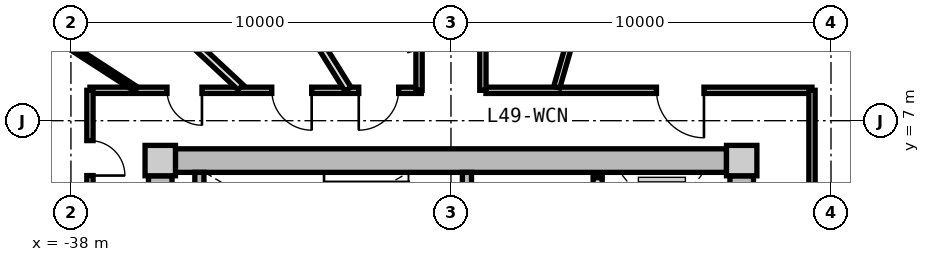
"""IFC4 building model, lengths in metres.
Left out: names, types, materials, properties, quantities, classifications, styles, units other than length and angle.
Written with IfcOpenShell. Run it as: python <this file> out.ifc"""

import sys

from ifc_helpers import new_model, si_unit, direction, frame, frame_2d, origin, origin_2d, place, context, subcontext, project, spatial, rectangle, extrude, source, transform, mapped, element, fill, save


model = new_model("IFC4")
c1 = context("Model", 3, precision=1e-05, world=origin(), true_north=direction((0.0, 1.0)))
c2 = subcontext(c1, "Body", "Model", "MODEL_VIEW")
j1 = project(units=[si_unit("LENGTHUNIT", "METRE"), si_unit("PLANEANGLEUNIT", "RADIAN")], contexts=[c1])
p1 = place(None, origin())
s1 = spatial("IfcSite", under=j1, at=p1, CompositionType="ELEMENT")
p2 = place(p1, origin())
s2 = spatial("IfcBuilding", under=s1, at=p2, CompositionType="ELEMENT")
p3 = place(p2, frame((0.0, 0.0, 158.7)))
s3 = spatial("IfcBuildingStorey", under=s2, at=p3, CompositionType="ELEMENT", Elevation=158.7)
m1 = source(origin(), c2, "Body", "SweptSolid", [
    extrude(rectangle(XDim=0.8, YDim=0.8, at=origin_2d()), origin(), (0.0, 0.0, 1.0), 3.05),
])
for number, where, z_axis, x_axis in (
    (1, (-20.35, 5.95, 0.0), (0.0, 0.0, 1.0), (1.0, 0.0, 0.0)),
    (2, (-35.65, 5.95, 0.0), (0.0, 0.0, 1.0), (1.0, 0.0, 0.0)),
):
    element("IfcColumn", number, at=place(p3, frame(where, z_axis=z_axis, x_axis=x_axis)), inside=s3, PredefinedType="COLUMN", context=c2, shape_type="MappedRepresentation", body=[
        mapped(m1, transform((0.0, 0.0, 0.0), x_axis=(1.0, 0.0, 0.0), y_axis=(0.0, 1.0, 0.0), z_axis=(0.0, 0.0, 1.0), scale=1.0)),
    ])
m2 = source(origin(), c2, "Body", "SweptSolid", [
    extrude(rectangle(XDim=14.5, YDim=0.62, at=frame_2d((7.25, 0.0))), origin(), (0.0, 0.0, 1.0), 2.81),
])
p4 = place(p3, frame((-35.25, 5.95, 0.0), z_axis=(0.0, 0.0, 1.0), x_axis=(1.0, 0.0, 0.0)))
e3 = element("IfcWall", 3, at=p4, inside=s3, PredefinedType="SHEAR", context=c2, shape_type="MappedRepresentation", body=[
    mapped(m2, transform((0.0, 0.0, 0.0), x_axis=(1.0, 0.0, 0.0), y_axis=(0.0, 1.0, 0.0), z_axis=(0.0, 0.0, 1.0), scale=1.0)),
])
m3 = source(origin(), c2, "Body", "SweptSolid", [
    extrude(rectangle(XDim=11.1, YDim=0.62, at=frame_2d((5.55, 0.0))), origin(), (0.0, 0.0, 1.0), 2.81),
])
p5 = place(p3, frame((-35.65, -5.55, 0.0), z_axis=(0.0, 0.0, 1.0), x_axis=(0.0, 1.0, 0.0)))
e4 = element("IfcWall", 4, at=p5, inside=s3, PredefinedType="SHEAR", context=c2, shape_type="MappedRepresentation", body=[
    mapped(m3, transform((0.0, 0.0, 0.0), x_axis=(1.0, 0.0, 0.0), y_axis=(0.0, 1.0, 0.0), z_axis=(0.0, 0.0, 1.0), scale=1.0)),
])
p6 = place(p5, frame((3.8, 0.0, 0.0)))
e5 = element("IfcOpeningElement", 5, at=p6, cuts=e4, PredefinedType="OPENING", context=c2, shape_type="SweptSolid", body=[
    extrude(rectangle(XDim=1.2, YDim=2.15, at=frame_2d((0.6, 1.075))), frame((0.0, 0.32, 0.0), z_axis=(0.0, -1.0, 0.0), x_axis=(1.0, 0.0, 0.0)), (0.0, 0.0, 1.0), 0.64),
])
p7 = place(p3, frame((-20.35, 5.55, 0.0), z_axis=(0.0, 0.0, 1.0), x_axis=(0.0, -1.0, 0.0)))
e6 = element("IfcWall", 6, at=p7, inside=s3, PredefinedType="SHEAR", context=c2, shape_type="MappedRepresentation", body=[
    mapped(m3, transform((0.0, 0.0, 0.0), x_axis=(1.0, 0.0, 0.0), y_axis=(0.0, 1.0, 0.0), z_axis=(0.0, 0.0, 1.0), scale=1.0)),
])
p8 = place(p7, frame((5.65, 0.0, 0.0)))
e7 = element("IfcOpeningElement", 7, at=p8, cuts=e6, PredefinedType="OPENING", context=c2, shape_type="SweptSolid", body=[
    extrude(rectangle(XDim=1.2, YDim=2.15, at=frame_2d((0.6, 1.075))), frame((0.0, 0.32, 0.0), z_axis=(0.0, -1.0, 0.0), x_axis=(1.0, 0.0, 0.0)), (0.0, 0.0, 1.0), 0.64),
])
m4 = source(origin(), c2, "Body", "SweptSolid", [
    extrude(rectangle(XDim=3.19, YDim=0.24, at=frame_2d((1.595, 0.0))), origin(), (0.0, 0.0, 1.0), 2.81),
])
p9 = place(p3, frame((-34.62, 2.45, 0.0), z_axis=(0.0, 0.0, 1.0), x_axis=(0.0, 1.0, 0.0)))
e8 = element("IfcWall", 8, at=p9, inside=s3, PredefinedType="PARTITIONING", context=c2, shape_type="MappedRepresentation", body=[
    mapped(m4, transform((0.0, 0.0, 0.0), x_axis=(1.0, 0.0, 0.0), y_axis=(0.0, 1.0, 0.0), z_axis=(0.0, 0.0, 1.0), scale=1.0)),
])
p10 = place(p3, frame((-27.58, 2.45, 0.0), z_axis=(0.0, 0.0, 1.0), x_axis=(0.0, 1.0, 0.0)))
e9 = element("IfcWall", 9, at=p10, inside=s3, PredefinedType="PARTITIONING", context=c2, shape_type="MappedRepresentation", body=[
    mapped(m4, transform((0.0, 0.0, 0.0), x_axis=(1.0, 0.0, 0.0), y_axis=(0.0, 1.0, 0.0), z_axis=(0.0, 0.0, 1.0), scale=1.0)),
])
p11 = place(p10, frame((0.55, 0.0, 0.0)))
e10 = element("IfcOpeningElement", 10, at=p11, cuts=e9, PredefinedType="OPENING", context=c2, shape_type="SweptSolid", body=[
    extrude(rectangle(XDim=1.1, YDim=2.15, at=frame_2d((0.55, 1.075))), frame((0.0, 0.13, 0.0), z_axis=(0.0, -1.0, 0.0), x_axis=(1.0, 0.0, 0.0)), (0.0, 0.0, 1.0), 0.26),
])
m5 = source(origin(), c2, "Body", "SweptSolid", [
    extrude(rectangle(XDim=5.0, YDim=0.24, at=frame_2d((2.5, 0.0))), origin(), (0.0, 0.0, 1.0), 2.795),
])
p12 = place(p3, frame((-24.14, 0.5, 0.0), z_axis=(0.0, 0.0, 1.0), x_axis=(0.0, 1.0, 0.0)))
e11 = element("IfcWall", 11, at=p12, inside=s3, PredefinedType="PARTITIONING", context=c2, shape_type="MappedRepresentation", body=[
    mapped(m5, transform((0.0, 0.0, 0.0), x_axis=(1.0, 0.0, 0.0), y_axis=(0.0, 1.0, 0.0), z_axis=(0.0, 0.0, 1.0), scale=1.0)),
])
p13 = place(p12, frame((3.05, 0.0, 0.0)))
e12 = element("IfcOpeningElement", 12, at=p13, cuts=e11, PredefinedType="OPENING", context=c2, shape_type="SweptSolid", body=[
    extrude(rectangle(XDim=1.3, YDim=2.2, at=frame_2d((0.65, 1.1))), frame((0.0, 0.13, 0.0), z_axis=(0.0, -1.0, 0.0), x_axis=(1.0, 0.0, 0.0)), (0.0, 0.0, 1.0), 0.26),
])
p14 = place(p12, frame((0.55, 0.0, 0.0)))
e13 = element("IfcOpeningElement", 13, at=p14, cuts=e11, PredefinedType="OPENING", context=c2, shape_type="SweptSolid", body=[
    extrude(rectangle(XDim=1.3, YDim=2.2, at=frame_2d((0.65, 1.1))), frame((0.0, 0.13, 0.0), z_axis=(0.0, -1.0, 0.0), x_axis=(1.0, 0.0, 0.0)), (0.0, 0.0, 1.0), 0.26),
])
m6 = source(origin(), c2, "Body", "SweptSolid", [
    extrude(rectangle(XDim=8.719, YDim=0.165, at=frame_2d((4.36, 0.0))), origin(), (0.0, 0.0, 1.0), 2.795),
])
p15 = place(p3, frame((-37.5, 7.8, 0.0), z_axis=(0.0, 0.0, 1.0), x_axis=(1.0, 0.0, 0.0)))
e14 = element("IfcWall", 14, at=p15, inside=s3, PredefinedType="PARTITIONING", context=c2, shape_type="MappedRepresentation", body=[
    mapped(m6, transform((0.0, 0.0, 0.0), x_axis=(1.0, 0.0, 0.0), y_axis=(0.0, 1.0, 0.0), z_axis=(0.0, 0.0, 1.0), scale=1.0)),
])
p16 = place(p15, frame((7.073, 0.0, 0.0)))
e15 = element("IfcOpeningElement", 15, at=p16, cuts=e14, PredefinedType="OPENING", context=c2, shape_type="SweptSolid", body=[
    extrude(rectangle(XDim=1.05, YDim=2.15, at=frame_2d((0.525, 1.075))), frame((0.0, 0.093, 0.0), z_axis=(0.0, -1.0, 0.0), x_axis=(1.0, 0.0, 0.0)), (0.0, 0.0, 1.0), 0.185),
])
p17 = place(p15, frame((4.785, 0.0, 0.0)))
e16 = element("IfcOpeningElement", 16, at=p17, cuts=e14, PredefinedType="OPENING", context=c2, shape_type="SweptSolid", body=[
    extrude(rectangle(XDim=1.05, YDim=2.15, at=frame_2d((0.525, 1.075))), frame((0.0, 0.093, 0.0), z_axis=(0.0, -1.0, 0.0), x_axis=(1.0, 0.0, 0.0)), (0.0, 0.0, 1.0), 0.185),
])
p18 = place(p15, frame((2.028, 0.0, 0.0)))
e17 = element("IfcOpeningElement", 17, at=p18, cuts=e14, PredefinedType="OPENING", context=c2, shape_type="SweptSolid", body=[
    extrude(rectangle(XDim=0.92, YDim=2.1, at=frame_2d((0.46, 1.05))), frame((0.0, 0.093, 0.0), z_axis=(0.0, -1.0, 0.0), x_axis=(1.0, 0.0, 0.0)), (0.0, 0.0, 1.0), 0.185),
])
m7 = source(origin(), c2, "Body", "SweptSolid", [
    extrude(rectangle(XDim=8.58, YDim=0.165, at=frame_2d((4.29, 0.0))), origin(), (0.0, 0.0, 1.0), 2.795),
])
p19 = place(p3, frame((-27.08, 7.8, 0.0), z_axis=(0.0, 0.0, 1.0), x_axis=(1.0, 0.0, 0.0)))
e18 = element("IfcWall", 18, at=p19, inside=s3, PredefinedType="PARTITIONING", context=c2, shape_type="MappedRepresentation", body=[
    mapped(m7, transform((0.0, 0.0, 0.0), x_axis=(1.0, 0.0, 0.0), y_axis=(0.0, 1.0, 0.0), z_axis=(0.0, 0.0, 1.0), scale=1.0)),
])
p20 = place(p19, frame((4.487, 0.0, 0.0)))
e19 = element("IfcOpeningElement", 19, at=p20, cuts=e18, PredefinedType="OPENING", context=c2, shape_type="SweptSolid", body=[
    extrude(rectangle(XDim=1.25, YDim=2.2, at=frame_2d((0.625, 1.1))), frame((0.0, 0.093, 0.0), z_axis=(0.0, -1.0, 0.0), x_axis=(1.0, 0.0, 0.0)), (0.0, 0.0, 1.0), 0.185),
])
m8 = source(origin(), c2, "Body", "SweptSolid", [
    extrude(rectangle(XDim=6.88, YDim=0.165, at=frame_2d((3.44, 0.0))), origin(), (0.0, 0.0, 1.0), 2.795),
])
p21 = place(p3, frame((-37.5, 0.92, 0.0), z_axis=(0.0, 0.0, 1.0), x_axis=(0.0, 1.0, 0.0)))
e20 = element("IfcWall", 20, at=p21, inside=s3, PredefinedType="PARTITIONING", context=c2, shape_type="MappedRepresentation", body=[
    mapped(m8, transform((0.0, 0.0, 0.0), x_axis=(1.0, 0.0, 0.0), y_axis=(0.0, 1.0, 0.0), z_axis=(0.0, 0.0, 1.0), scale=1.0)),
])
p22 = place(p21, frame((4.636, 0.0, 0.0)))
e21 = element("IfcOpeningElement", 21, at=p22, cuts=e20, PredefinedType="OPENING", context=c2, shape_type="SweptSolid", body=[
    extrude(rectangle(XDim=0.92, YDim=2.1, at=frame_2d((0.46, 1.05))), frame((0.0, 0.093, 0.0), z_axis=(0.0, -1.0, 0.0), x_axis=(1.0, 0.0, 0.0)), (0.0, 0.0, 1.0), 0.185),
])
p23 = place(p3, frame((-18.5, 7.8, 0.0), z_axis=(0.0, 0.0, 1.0), x_axis=(0.0, -1.0, 0.0)))
e22 = element("IfcWall", 22, at=p23, inside=s3, PredefinedType="PARTITIONING", context=c2, shape_type="MappedRepresentation", body=[
    mapped(m8, transform((0.0, 0.0, 0.0), x_axis=(1.0, 0.0, 0.0), y_axis=(0.0, 1.0, 0.0), z_axis=(0.0, 0.0, 1.0), scale=1.0)),
])
m9 = source(origin(), c2, "Body", "SweptSolid", [
    extrude(rectangle(XDim=9.73, YDim=0.165, at=frame_2d((4.865, 0.0))), origin(), (0.0, 0.0, 1.0), 2.345),
])
p24 = place(p3, frame((-25.217, 7.88, 0.0), z_axis=(0.0, 0.0, 1.0), x_axis=(0.27679492614, 0.960929013436, 0.0)))
e23 = element("IfcWall", 23, at=p24, inside=s3, PredefinedType="PARTITIONING", context=c2, shape_type="MappedRepresentation", body=[
    mapped(m9, transform((0.0, 0.0, 0.0), x_axis=(1.0, 0.0, 0.0), y_axis=(0.0, 1.0, 0.0), z_axis=(0.0, 0.0, 1.0), scale=1.0)),
])
m10 = source(origin(), c2, "Body", "SweptSolid", [
    extrude(rectangle(XDim=6.193, YDim=0.165, at=frame_2d((3.096, 0.0))), origin(), (0.0, 0.0, 1.0), 2.345),
])
p25 = place(p3, frame((-37.58, 4.419, 0.0), z_axis=(0.0, 0.0, 1.0), x_axis=(-0.970309243466, 0.241867674657, 0.0)))
e24 = element("IfcWall", 24, at=p25, inside=s3, PredefinedType="PARTITIONING", context=c2, shape_type="MappedRepresentation", body=[
    mapped(m10, transform((0.0, 0.0, 0.0), x_axis=(1.0, 0.0, 0.0), y_axis=(0.0, 1.0, 0.0), z_axis=(0.0, 0.0, 1.0), scale=1.0)),
])
m11 = source(origin(), c2, "Body", "SweptSolid", [
    extrude(rectangle(XDim=8.305, YDim=0.165, at=frame_2d((4.153, 0.0))), origin(), (0.0, 0.0, 1.0), 2.345),
])
p26 = place(p3, frame((-18.42, 3.908, 0.0), z_axis=(0.0, 0.0, 1.0), x_axis=(0.970309994378, 0.241864662175, 0.0)))
e25 = element("IfcWall", 25, at=p26, inside=s3, PredefinedType="PARTITIONING", context=c2, shape_type="MappedRepresentation", body=[
    mapped(m11, transform((0.0, 0.0, 0.0), x_axis=(1.0, 0.0, 0.0), y_axis=(0.0, 1.0, 0.0), z_axis=(0.0, 0.0, 1.0), scale=1.0)),
])
m12 = source(origin(), c2, "Body", "SweptSolid", [
    extrude(rectangle(XDim=9.48, YDim=0.165, at=frame_2d((4.74, 0.0))), origin(), (0.0, 0.0, 1.0), 2.795),
])
p27 = place(p3, frame((-28.84, 7.8, 0.0), z_axis=(0.0, 0.0, 1.0), x_axis=(0.0, 1.0, 0.0)))
e26 = element("IfcWall", 26, at=p27, inside=s3, PredefinedType="PARTITIONING", context=c2, shape_type="MappedRepresentation", body=[
    mapped(m12, transform((0.0, 0.0, 0.0), x_axis=(1.0, 0.0, 0.0), y_axis=(0.0, 1.0, 0.0), z_axis=(0.0, 0.0, 1.0), scale=1.0)),
])
p28 = place(p27, frame((4.521, 0.0, 0.0)))
e27 = element("IfcOpeningElement", 27, at=p28, cuts=e26, PredefinedType="OPENING", context=c2, shape_type="SweptSolid", body=[
    extrude(rectangle(XDim=0.95, YDim=2.1, at=frame_2d((0.475, 1.05))), frame((0.0, 0.093, 0.0), z_axis=(0.0, -1.0, 0.0), x_axis=(1.0, 0.0, 0.0)), (0.0, 0.0, 1.0), 0.185),
])
p29 = place(p3, frame((-27.16, 17.28, 0.0), z_axis=(0.0, 0.0, 1.0), x_axis=(0.0, -1.0, 0.0)))
e28 = element("IfcWall", 28, at=p29, inside=s3, PredefinedType="PARTITIONING", context=c2, shape_type="MappedRepresentation", body=[
    mapped(m12, transform((0.0, 0.0, 0.0), x_axis=(1.0, 0.0, 0.0), y_axis=(0.0, 1.0, 0.0), z_axis=(0.0, 0.0, 1.0), scale=1.0)),
])
p30 = place(p29, frame((4.265, 0.0, 0.0)))
e29 = element("IfcOpeningElement", 29, at=p30, cuts=e28, PredefinedType="OPENING", context=c2, shape_type="SweptSolid", body=[
    extrude(rectangle(XDim=0.95, YDim=2.1, at=frame_2d((0.475, 1.05))), frame((0.0, 0.093, 0.0), z_axis=(0.0, -1.0, 0.0), x_axis=(1.0, 0.0, 0.0)), (0.0, 0.0, 1.0), 0.185),
])
m13 = source(origin(), c2, "Body", "SweptSolid", [
    extrude(rectangle(XDim=7.648, YDim=0.19, at=frame_2d((3.824, 0.0))), origin(), (0.0, 0.0, 1.0), 2.345),
])
p31 = place(p3, frame((-33.538, 7.88, 0.0), z_axis=(0.0, 0.0, 1.0), x_axis=(-0.732167856666, 0.681124239522, 0.0)))
e30 = element("IfcWall", 30, at=p31, inside=s3, PredefinedType="PARTITIONING", context=c2, shape_type="MappedRepresentation", body=[
    mapped(m13, transform((0.0, 0.0, 0.0), x_axis=(1.0, 0.0, 0.0), y_axis=(0.0, 1.0, 0.0), z_axis=(0.0, 0.0, 1.0), scale=1.0)),
])
m14 = source(origin(), c2, "Body", "SweptSolid", [
    extrude(rectangle(XDim=8.638, YDim=0.19, at=frame_2d((4.319, 0.0))), origin(), (0.0, 0.0, 1.0), 2.795),
])
p32 = place(p3, frame((-30.711, 7.83, 0.0), z_axis=(0.0, 0.0, 1.0), x_axis=(-0.529150133108, 0.848528217935, 0.0)))
e31 = element("IfcWall", 31, at=p32, inside=s3, PredefinedType="PARTITIONING", context=c2, shape_type="MappedRepresentation", body=[
    mapped(m14, transform((0.0, 0.0, 0.0), x_axis=(1.0, 0.0, 0.0), y_axis=(0.0, 1.0, 0.0), z_axis=(0.0, 0.0, 1.0), scale=1.0)),
])
m15 = source(origin(), c2, "Body", "SweptSolid", [
    extrude(rectangle(XDim=5.197, YDim=0.14, at=frame_2d((2.598, 0.0))), origin(), (0.0, 0.0, 1.0), 2.795),
])
p33 = place(p3, frame((-36.286, 7.83, 0.0), z_axis=(0.0, 0.0, 1.0), x_axis=(-0.839929187515, 0.542696010637, 0.0)))
e32 = element("IfcWall", 32, at=p33, inside=s3, PredefinedType="PARTITIONING", context=c2, shape_type="MappedRepresentation", body=[
    mapped(m15, transform((0.0, 0.0, 0.0), x_axis=(1.0, 0.0, 0.0), y_axis=(0.0, 1.0, 0.0), z_axis=(0.0, 0.0, 1.0), scale=1.0)),
])
m16 = source(origin(), c2, "Body", "SweptSolid", [
    extrude(rectangle(XDim=1.25, YDim=2.2, at=frame_2d((0.625, 1.1))), frame((0.0, 0.025, 0.0), z_axis=(0.0, -1.0, 0.0), x_axis=(1.0, 0.0, 0.0)), (0.0, 0.0, 1.0), 0.05),
])
p34 = place(p20, frame((1.25, 0.0, 0.0), z_axis=(0.0, 0.0, 1.0), x_axis=(-1.0, 0.0, 0.0)))
e33 = element("IfcDoor", 33, at=p34, inside=s3, OperationType="SINGLE_SWING_LEFT", PredefinedType="DOOR", context=c2, shape_type="MappedRepresentation", body=[
    mapped(m16, transform((0.0, 0.0, 0.0), x_axis=(1.0, 0.0, 0.0), y_axis=(0.0, 1.0, 0.0), z_axis=(0.0, 0.0, 1.0), scale=1.0)),
])
fill(e19, e33)
m17 = source(origin(), c2, "Body", "SweptSolid", [
    extrude(rectangle(XDim=1.05, YDim=2.15, at=frame_2d((0.525, 1.075))), frame((0.0, 0.025, 0.0), z_axis=(0.0, -1.0, 0.0), x_axis=(1.0, 0.0, 0.0)), (0.0, 0.0, 1.0), 0.05),
])
p35 = place(p16, frame((1.05, 0.0, 0.0), z_axis=(0.0, 0.0, 1.0), x_axis=(-1.0, 0.0, 0.0)))
e34 = element("IfcDoor", 34, at=p35, inside=s3, OperationType="SINGLE_SWING_RIGHT", PredefinedType="DOOR", context=c2, shape_type="MappedRepresentation", body=[
    mapped(m17, transform((0.0, 0.0, 0.0), x_axis=(1.0, 0.0, 0.0), y_axis=(0.0, 1.0, 0.0), z_axis=(0.0, 0.0, 1.0), scale=1.0)),
])
fill(e15, e34)
p36 = place(p17, frame((1.05, 0.0, 0.0), z_axis=(0.0, 0.0, 1.0), x_axis=(-1.0, 0.0, 0.0)))
e35 = element("IfcDoor", 35, at=p36, inside=s3, OperationType="SINGLE_SWING_LEFT", PredefinedType="DOOR", context=c2, shape_type="MappedRepresentation", body=[
    mapped(m17, transform((0.0, 0.0, 0.0), x_axis=(1.0, 0.0, 0.0), y_axis=(0.0, 1.0, 0.0), z_axis=(0.0, 0.0, 1.0), scale=1.0)),
])
fill(e16, e35)
m18 = source(origin(), c2, "Body", "SweptSolid", [
    extrude(rectangle(XDim=0.92, YDim=2.1, at=frame_2d((0.46, 1.05))), frame((0.0, 0.025, 0.0), z_axis=(0.0, -1.0, 0.0), x_axis=(1.0, 0.0, 0.0)), (0.0, 0.0, 1.0), 0.05),
])
p37 = place(p18, frame((0.92, 0.0, 0.0), z_axis=(0.0, 0.0, 1.0), x_axis=(-1.0, 0.0, 0.0)))
e36 = element("IfcDoor", 36, at=p37, inside=s3, OperationType="SINGLE_SWING_LEFT", PredefinedType="DOOR", context=c2, shape_type="MappedRepresentation", body=[
    mapped(m18, transform((0.0, 0.0, 0.0), x_axis=(1.0, 0.0, 0.0), y_axis=(0.0, 1.0, 0.0), z_axis=(0.0, 0.0, 1.0), scale=1.0)),
])
fill(e17, e36)
p38 = place(p22, frame((0.92, 0.0, 0.0), z_axis=(0.0, 0.0, 1.0), x_axis=(-1.0, 0.0, 0.0)))
e37 = element("IfcDoor", 37, at=p38, inside=s3, OperationType="SINGLE_SWING_RIGHT", PredefinedType="DOOR", context=c2, shape_type="MappedRepresentation", body=[
    mapped(m18, transform((0.0, 0.0, 0.0), x_axis=(1.0, 0.0, 0.0), y_axis=(0.0, 1.0, 0.0), z_axis=(0.0, 0.0, 1.0), scale=1.0)),
])
fill(e21, e37)
save(model, sys.argv[1])
